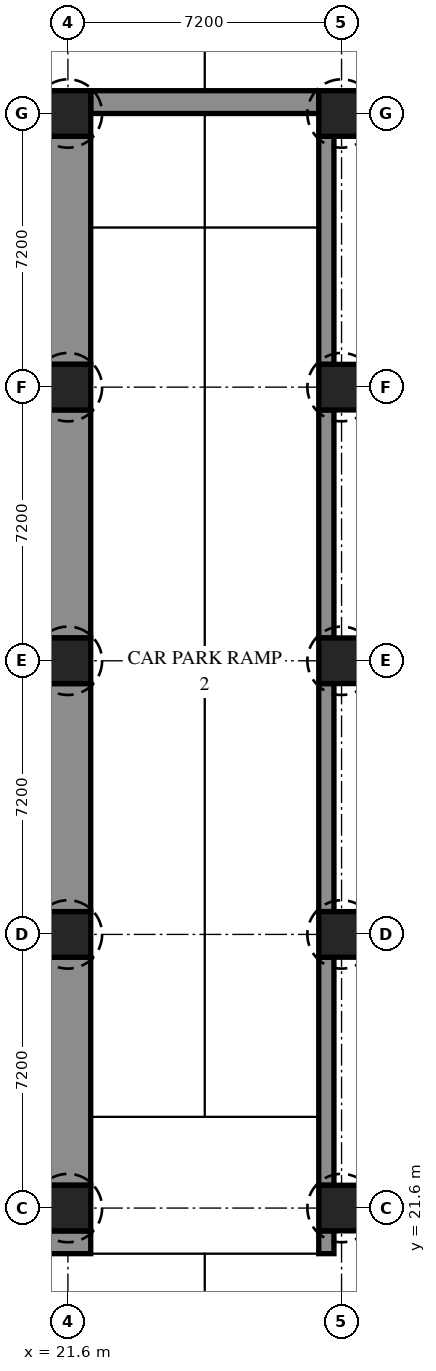
"""IFC4 building model, lengths in metres.
Left out: names, types, materials, properties, quantities, classifications, styles, units other than length and angle.
Written with IfcOpenShell. Run it as: python <this file> out.ifc"""

import sys

from ifc_helpers import new_model, si_unit, direction, frame, frame_2d, origin, origin_2d, place, context, subcontext, project, spatial, rectangle, extrude, element, save


model = new_model("IFC4")
c1 = context("Model", 3, precision=1e-05, world=origin(), true_north=direction((0.0, 1.0)))
c2 = subcontext(c1, "Body", "Model", "MODEL_VIEW")
j1 = project(units=[si_unit("LENGTHUNIT", "METRE"), si_unit("PLANEANGLEUNIT", "RADIAN")], contexts=[c1])
p1 = place(None, origin())
s1 = spatial("IfcSite", under=j1, at=p1, CompositionType="ELEMENT")
p2 = place(p1, origin())
s2 = spatial("IfcBuilding", under=s1, at=p2, CompositionType="ELEMENT")
p3 = place(p2, frame((0.0, 0.0, -9.0)))
s3 = spatial("IfcBuildingStorey", under=s2, at=p3, CompositionType="ELEMENT", Elevation=-9.0)
for number, where, z_axis, x_axis in (
    (1, (21.6, 21.6, 0.0), (0.0, 0.0, 1.0), (1.0, 0.0, 0.0)),
    (2, (21.6, 28.8, 0.0), (0.0, 0.0, 1.0), (1.0, 0.0, 0.0)),
    (3, (21.6, 36.0, 0.0), (0.0, 0.0, 1.0), (1.0, 0.0, 0.0)),
    (4, (21.6, 43.2, 0.0), (0.0, 0.0, 1.0), (1.0, 0.0, 0.0)),
    (5, (21.6, 50.4, 0.0), (0.0, 0.0, 1.0), (1.0, 0.0, 0.0)),
    (6, (28.8, 21.6, 0.0), (0.0, 0.0, 1.0), (1.0, 0.0, 0.0)),
    (7, (28.8, 28.8, 0.0), (0.0, 0.0, 1.0), (1.0, 0.0, 0.0)),
    (8, (28.8, 36.0, 0.0), (0.0, 0.0, 1.0), (1.0, 0.0, 0.0)),
    (9, (28.8, 43.2, 0.0), (0.0, 0.0, 1.0), (1.0, 0.0, 0.0)),
    (10, (28.8, 50.4, 0.0), (0.0, 0.0, 1.0), (1.0, 0.0, 0.0)),
):
    element("IfcColumn", number, at=place(p3, frame(where, z_axis=z_axis, x_axis=x_axis)), inside=s3, PredefinedType="COLUMN", context=c2, shape_type="SweptSolid", body=[
        extrude(rectangle(XDim=1.2, YDim=1.2, at=origin_2d()), origin(), (0.0, 0.0, 1.0), 4.2),
    ])
p4 = place(p3, frame((21.6, 20.4, 0.0), z_axis=(0.0, 0.0, 1.0), x_axis=(0.0, 1.0, 0.0)))
e11 = element("IfcWall", 11, at=p4, inside=s3, PredefinedType="SOLIDWALL", context=c2, shape_type="SweptSolid", body=[
    extrude(rectangle(XDim=0.6, YDim=1.2, at=frame_2d((0.3, 0.0))), origin(), (0.0, 0.0, 1.0), 4.2),
])
for number, where, z_axis, x_axis in (
    (12, (21.6, 22.2, 0.0), (0.0, 0.0, 1.0), (0.0, 1.0, 0.0)),
    (13, (21.6, 29.4, 0.0), (0.0, 0.0, 1.0), (0.0, 1.0, 0.0)),
    (14, (21.6, 36.6, 0.0), (0.0, 0.0, 1.0), (0.0, 1.0, 0.0)),
    (15, (21.6, 43.8, 0.0), (0.0, 0.0, 1.0), (0.0, 1.0, 0.0)),
):
    element("IfcWall", number, at=place(p3, frame(where, z_axis=z_axis, x_axis=x_axis)), inside=s3, PredefinedType="SOLIDWALL", context=c2, shape_type="SweptSolid", body=[
        extrude(rectangle(XDim=6.0, YDim=1.2, at=frame_2d((3.0, 0.0))), origin(), (0.0, 0.0, 1.0), 4.2),
    ])
p5 = place(p3, frame((28.4, 20.4, 0.0), z_axis=(0.0, 0.0, 1.0), x_axis=(0.0, 1.0, 0.0)))
e16 = element("IfcWall", 16, at=p5, inside=s3, PredefinedType="SOLIDWALL", context=c2, shape_type="SweptSolid", body=[
    extrude(rectangle(XDim=0.6, YDim=0.4, at=frame_2d((0.3, 0.0))), origin(), (0.0, 0.0, 1.0), 4.2),
])
for number, where, z_axis, x_axis in (
    (17, (28.4, 22.2, 0.0), (0.0, 0.0, 1.0), (0.0, 1.0, 0.0)),
    (18, (28.4, 29.4, 0.0), (0.0, 0.0, 1.0), (0.0, 1.0, 0.0)),
    (19, (28.4, 36.6, 0.0), (0.0, 0.0, 1.0), (0.0, 1.0, 0.0)),
    (20, (28.4, 43.8, 0.0), (0.0, 0.0, 1.0), (0.0, 1.0, 0.0)),
):
    element("IfcWall", number, at=place(p3, frame(where, z_axis=z_axis, x_axis=x_axis)), inside=s3, PredefinedType="SOLIDWALL", context=c2, shape_type="SweptSolid", body=[
        extrude(rectangle(XDim=6.0, YDim=0.4, at=frame_2d((3.0, 0.0))), origin(), (0.0, 0.0, 1.0), 4.2),
    ])
p6 = place(p3, frame((22.2, 50.7, 0.0), z_axis=(0.0, 0.0, 1.0), x_axis=(1.0, 0.0, 0.0)))
e21 = element("IfcWall", 21, at=p6, inside=s3, PredefinedType="SOLIDWALL", context=c2, shape_type="SweptSolid", body=[
    extrude(rectangle(XDim=6.0, YDim=0.6, at=frame_2d((3.0, 0.0))), origin(), (0.0, 0.0, 1.0), 4.2),
])
save(model, sys.argv[1])
